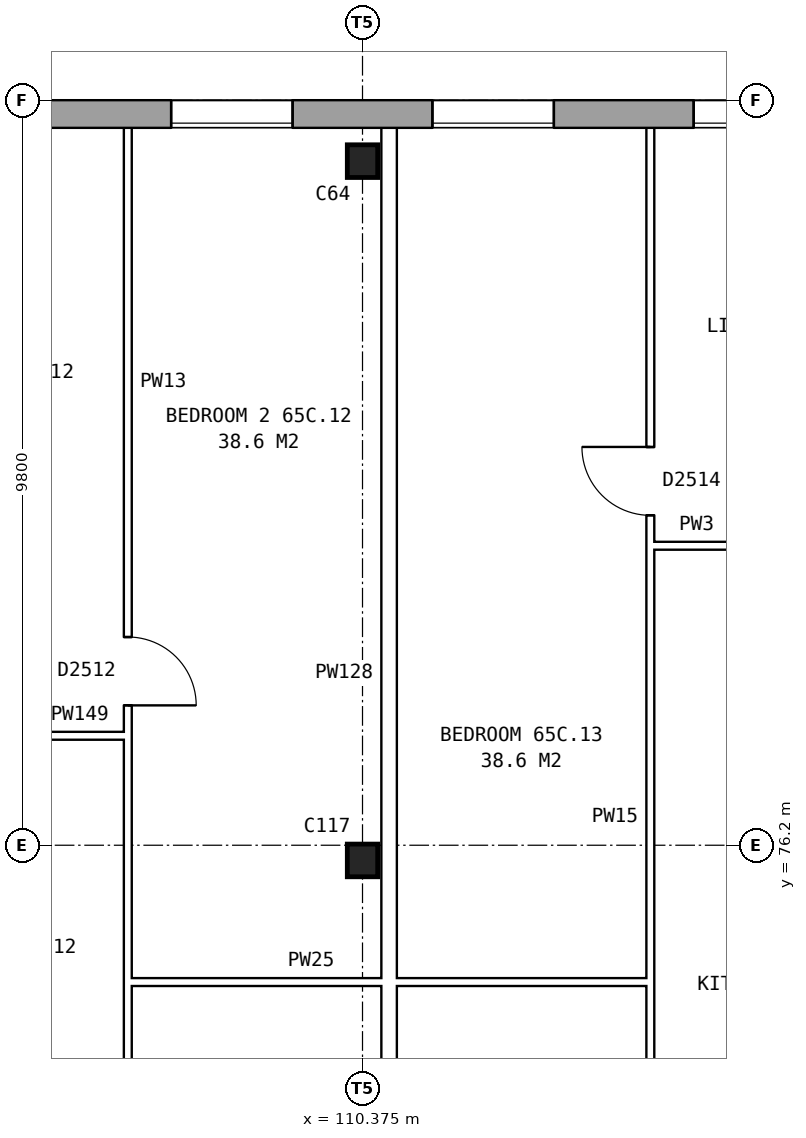
"""IFC4 building model, lengths in metres.
Left out: names, types, materials, properties, quantities, classifications, styles, units other than length and angle.
Written with IfcOpenShell. Run it as: python <this file> out.ifc"""

import sys

from ifc_helpers import new_model, si_unit, direction, frame, frame_2d, origin, origin_2d, place, context, subcontext, project, spatial, rectangle, i_section, extrude, element, fill, save


model = new_model("IFC4")
c1 = context("Model", 3, precision=1e-05, world=origin(), true_north=direction((0.0, 1.0)))
c2 = subcontext(c1, "Body", "Model", "MODEL_VIEW")
j1 = project(units=[si_unit("LENGTHUNIT", "METRE"), si_unit("PLANEANGLEUNIT", "RADIAN")], contexts=[c1])
p1 = place(None, origin())
s1 = spatial("IfcSite", under=j1, at=p1, CompositionType="ELEMENT")
p2 = place(p1, origin())
s2 = spatial("IfcBuilding", under=s1, at=p2, CompositionType="ELEMENT")
p3 = place(p2, frame((0.0, 0.0, 230.7)))
s3 = spatial("IfcBuildingStorey", under=s2, at=p3, CompositionType="ELEMENT", Elevation=230.7)
for number, where, z_axis, x_axis in (
    (1, (110.375, 76.0, 0.0), (0.0, 0.0, 1.0), (1.0, 0.0, 0.0)),
    (2, (110.375, 85.2, 0.0), (0.0, 0.0, 1.0), (1.0, 0.0, 0.0)),
):
    element("IfcColumn", number, at=place(p3, frame(where, z_axis=z_axis, x_axis=x_axis)), inside=s3, PredefinedType="COLUMN", context=c2, shape_type="SweptSolid", body=[
        extrude(i_section(OverallWidth=0.4, OverallDepth=0.43, WebThickness=0.028, FlangeThickness=0.04, at=origin_2d()), origin(), (0.0, 0.0, 1.0), 2.85),
    ])
p4 = place(p3, frame((131.05, 85.82, 0.0), z_axis=(0.0, 0.0, 1.0), x_axis=(-1.0, 0.0, 0.0)))
e3 = element("IfcWall", 3, at=p4, inside=s3, PredefinedType="STANDARD", context=c2, shape_type="SweptSolid", body=[
    extrude(rectangle(XDim=55.1, YDim=0.36, at=frame_2d((27.55, 0.0))), origin(), (0.0, 0.0, 1.0), 2.85),
])
p5 = place(p4, frame((0.969, 0.0, 0.8)))
e4 = element("IfcOpeningElement", 4, at=p5, cuts=e3, PredefinedType="OPENING", context=c2, shape_type="SweptSolid", body=[
    extrude(rectangle(XDim=1.6, YDim=1.8, at=frame_2d((0.8, 0.9))), frame((0.0, 0.19, 0.0), z_axis=(0.0, -1.0, 0.0), x_axis=(1.0, 0.0, 0.0)), (0.0, 0.0, 1.0), 0.38),
])
p6 = place(p4, frame((4.406, 0.0, 0.8)))
e5 = element("IfcOpeningElement", 5, at=p6, cuts=e3, PredefinedType="OPENING", context=c2, shape_type="SweptSolid", body=[
    extrude(rectangle(XDim=1.6, YDim=1.8, at=frame_2d((0.8, 0.9))), frame((0.0, 0.19, 0.0), z_axis=(0.0, -1.0, 0.0), x_axis=(1.0, 0.0, 0.0)), (0.0, 0.0, 1.0), 0.38),
])
p7 = place(p4, frame((7.844, 0.0, 0.8)))
e6 = element("IfcOpeningElement", 6, at=p7, cuts=e3, PredefinedType="OPENING", context=c2, shape_type="SweptSolid", body=[
    extrude(rectangle(XDim=1.6, YDim=1.8, at=frame_2d((0.8, 0.9))), frame((0.0, 0.19, 0.0), z_axis=(0.0, -1.0, 0.0), x_axis=(1.0, 0.0, 0.0)), (0.0, 0.0, 1.0), 0.38),
])
p8 = place(p4, frame((11.281, 0.0, 0.8)))
e7 = element("IfcOpeningElement", 7, at=p8, cuts=e3, PredefinedType="OPENING", context=c2, shape_type="SweptSolid", body=[
    extrude(rectangle(XDim=1.6, YDim=1.8, at=frame_2d((0.8, 0.9))), frame((0.0, 0.19, 0.0), z_axis=(0.0, -1.0, 0.0), x_axis=(1.0, 0.0, 0.0)), (0.0, 0.0, 1.0), 0.38),
])
p9 = place(p4, frame((14.719, 0.0, 0.8)))
e8 = element("IfcOpeningElement", 8, at=p9, cuts=e3, PredefinedType="OPENING", context=c2, shape_type="SweptSolid", body=[
    extrude(rectangle(XDim=1.6, YDim=1.8, at=frame_2d((0.8, 0.9))), frame((0.0, 0.19, 0.0), z_axis=(0.0, -1.0, 0.0), x_axis=(1.0, 0.0, 0.0)), (0.0, 0.0, 1.0), 0.38),
])
p10 = place(p4, frame((18.156, 0.0, 0.8)))
e9 = element("IfcOpeningElement", 9, at=p10, cuts=e3, PredefinedType="OPENING", context=c2, shape_type="SweptSolid", body=[
    extrude(rectangle(XDim=1.6, YDim=1.8, at=frame_2d((0.8, 0.9))), frame((0.0, 0.19, 0.0), z_axis=(0.0, -1.0, 0.0), x_axis=(1.0, 0.0, 0.0)), (0.0, 0.0, 1.0), 0.38),
])
p11 = place(p4, frame((21.594, 0.0, 0.8)))
e10 = element("IfcOpeningElement", 10, at=p11, cuts=e3, PredefinedType="OPENING", context=c2, shape_type="SweptSolid", body=[
    extrude(rectangle(XDim=1.6, YDim=1.8, at=frame_2d((0.8, 0.9))), frame((0.0, 0.19, 0.0), z_axis=(0.0, -1.0, 0.0), x_axis=(1.0, 0.0, 0.0)), (0.0, 0.0, 1.0), 0.38),
])
p12 = place(p4, frame((25.031, 0.0, 0.8)))
e11 = element("IfcOpeningElement", 11, at=p12, cuts=e3, PredefinedType="OPENING", context=c2, shape_type="SweptSolid", body=[
    extrude(rectangle(XDim=1.6, YDim=1.8, at=frame_2d((0.8, 0.9))), frame((0.0, 0.19, 0.0), z_axis=(0.0, -1.0, 0.0), x_axis=(1.0, 0.0, 0.0)), (0.0, 0.0, 1.0), 0.38),
])
p13 = place(p4, frame((28.469, 0.0, 0.8)))
e12 = element("IfcOpeningElement", 12, at=p13, cuts=e3, PredefinedType="OPENING", context=c2, shape_type="SweptSolid", body=[
    extrude(rectangle(XDim=1.6, YDim=1.8, at=frame_2d((0.8, 0.9))), frame((0.0, 0.19, 0.0), z_axis=(0.0, -1.0, 0.0), x_axis=(1.0, 0.0, 0.0)), (0.0, 0.0, 1.0), 0.38),
])
p14 = place(p4, frame((31.906, 0.0, 0.8)))
e13 = element("IfcOpeningElement", 13, at=p14, cuts=e3, PredefinedType="OPENING", context=c2, shape_type="SweptSolid", body=[
    extrude(rectangle(XDim=1.6, YDim=1.8, at=frame_2d((0.8, 0.9))), frame((0.0, 0.19, 0.0), z_axis=(0.0, -1.0, 0.0), x_axis=(1.0, 0.0, 0.0)), (0.0, 0.0, 1.0), 0.38),
])
p15 = place(p4, frame((35.344, 0.0, 0.8)))
e14 = element("IfcOpeningElement", 14, at=p15, cuts=e3, PredefinedType="OPENING", context=c2, shape_type="SweptSolid", body=[
    extrude(rectangle(XDim=1.6, YDim=1.8, at=frame_2d((0.8, 0.9))), frame((0.0, 0.19, 0.0), z_axis=(0.0, -1.0, 0.0), x_axis=(1.0, 0.0, 0.0)), (0.0, 0.0, 1.0), 0.38),
])
p16 = place(p4, frame((38.781, 0.0, 0.8)))
e15 = element("IfcOpeningElement", 15, at=p16, cuts=e3, PredefinedType="OPENING", context=c2, shape_type="SweptSolid", body=[
    extrude(rectangle(XDim=1.6, YDim=1.8, at=frame_2d((0.8, 0.9))), frame((0.0, 0.19, 0.0), z_axis=(0.0, -1.0, 0.0), x_axis=(1.0, 0.0, 0.0)), (0.0, 0.0, 1.0), 0.38),
])
p17 = place(p4, frame((42.219, 0.0, 0.8)))
e16 = element("IfcOpeningElement", 16, at=p17, cuts=e3, PredefinedType="OPENING", context=c2, shape_type="SweptSolid", body=[
    extrude(rectangle(XDim=1.6, YDim=1.8, at=frame_2d((0.8, 0.9))), frame((0.0, 0.19, 0.0), z_axis=(0.0, -1.0, 0.0), x_axis=(1.0, 0.0, 0.0)), (0.0, 0.0, 1.0), 0.38),
])
p18 = place(p4, frame((45.656, 0.0, 0.8)))
e17 = element("IfcOpeningElement", 17, at=p18, cuts=e3, PredefinedType="OPENING", context=c2, shape_type="SweptSolid", body=[
    extrude(rectangle(XDim=1.6, YDim=1.8, at=frame_2d((0.8, 0.9))), frame((0.0, 0.19, 0.0), z_axis=(0.0, -1.0, 0.0), x_axis=(1.0, 0.0, 0.0)), (0.0, 0.0, 1.0), 0.38),
])
p19 = place(p4, frame((49.094, 0.0, 0.8)))
e18 = element("IfcOpeningElement", 18, at=p19, cuts=e3, PredefinedType="OPENING", context=c2, shape_type="SweptSolid", body=[
    extrude(rectangle(XDim=1.6, YDim=1.8, at=frame_2d((0.8, 0.9))), frame((0.0, 0.19, 0.0), z_axis=(0.0, -1.0, 0.0), x_axis=(1.0, 0.0, 0.0)), (0.0, 0.0, 1.0), 0.38),
])
p20 = place(p4, frame((52.531, 0.0, 0.8)))
e19 = element("IfcOpeningElement", 19, at=p20, cuts=e3, PredefinedType="OPENING", context=c2, shape_type="SweptSolid", body=[
    extrude(rectangle(XDim=1.6, YDim=1.8, at=frame_2d((0.8, 0.9))), frame((0.0, 0.19, 0.0), z_axis=(0.0, -1.0, 0.0), x_axis=(1.0, 0.0, 0.0)), (0.0, 0.0, 1.0), 0.38),
])
p21 = place(p3, frame((107.287, 74.4, 0.0), z_axis=(0.0, 0.0, 1.0), x_axis=(1.0, 0.0, 0.0)))
e20 = element("IfcWall", 20, at=p21, inside=s3, PredefinedType="PARTITIONING", context=c2, shape_type="SweptSolid", body=[
    extrude(rectangle(XDim=6.875, YDim=0.1, at=frame_2d((3.438, 0.0))), origin(), (0.0, 0.0, 1.0), 2.85),
])
p22 = place(p3, frame((103.85, 77.64, 0.0), z_axis=(0.0, 0.0, 1.0), x_axis=(1.0, 0.0, 0.0)))
e21 = element("IfcWall", 21, at=p22, inside=s3, PredefinedType="PARTITIONING", context=c2, shape_type="SweptSolid", body=[
    extrude(rectangle(XDim=3.437, YDim=0.1, at=frame_2d((1.719, 0.0))), origin(), (0.0, 0.0, 1.0), 2.85),
])
p23 = place(p22, frame((1.269, 0.0, 0.0)))
e22 = element("IfcOpeningElement", 22, at=p23, cuts=e21, PredefinedType="OPENING", context=c2, shape_type="SweptSolid", body=[
    extrude(rectangle(XDim=0.9, YDim=2.1, at=frame_2d((0.45, 1.05))), frame((0.0, 0.06, 0.0), z_axis=(0.0, -1.0, 0.0), x_axis=(1.0, 0.0, 0.0)), (0.0, 0.0, 1.0), 0.12),
])
p24 = place(p3, frame((114.162, 80.14, 0.0), z_axis=(0.0, 0.0, 1.0), x_axis=(1.0, 0.0, 0.0)))
e23 = element("IfcWall", 23, at=p24, inside=s3, PredefinedType="PARTITIONING", context=c2, shape_type="SweptSolid", body=[
    extrude(rectangle(XDim=3.338, YDim=0.1, at=frame_2d((1.669, 0.0))), origin(), (0.0, 0.0, 1.0), 2.85),
])
p25 = place(p24, frame((1.219, 0.0, 0.0)))
e24 = element("IfcOpeningElement", 24, at=p25, cuts=e23, PredefinedType="OPENING", context=c2, shape_type="SweptSolid", body=[
    extrude(rectangle(XDim=0.9, YDim=2.1, at=frame_2d((0.45, 1.05))), frame((0.0, 0.06, 0.0), z_axis=(0.0, -1.0, 0.0), x_axis=(1.0, 0.0, 0.0)), (0.0, 0.0, 1.0), 0.12),
])
p26 = place(p3, frame((107.287, 71.3, 0.0), z_axis=(0.0, 0.0, 1.0), x_axis=(0.0, 1.0, 0.0)))
e25 = element("IfcWall", 25, at=p26, inside=s3, PredefinedType="PARTITIONING", context=c2, shape_type="SweptSolid", body=[
    extrude(rectangle(XDim=14.34, YDim=0.1, at=frame_2d((7.17, 0.0))), origin(), (0.0, 0.0, 1.0), 2.85),
])
p27 = place(p26, frame((6.74, 0.0, 0.0)))
e26 = element("IfcOpeningElement", 26, at=p27, cuts=e25, PredefinedType="OPENING", context=c2, shape_type="SweptSolid", body=[
    extrude(rectangle(XDim=0.9, YDim=2.1, at=frame_2d((0.45, 1.05))), frame((0.0, 0.06, 0.0), z_axis=(0.0, -1.0, 0.0), x_axis=(1.0, 0.0, 0.0)), (0.0, 0.0, 1.0), 0.12),
])
p28 = place(p26, frame((0.4, 0.0, 0.0)))
e27 = element("IfcOpeningElement", 27, at=p28, cuts=e25, PredefinedType="OPENING", context=c2, shape_type="SweptSolid", body=[
    extrude(rectangle(XDim=0.9, YDim=2.1, at=frame_2d((0.45, 1.05))), frame((0.0, 0.06, 0.0), z_axis=(0.0, -1.0, 0.0), x_axis=(1.0, 0.0, 0.0)), (0.0, 0.0, 1.0), 0.12),
])
p29 = place(p3, frame((110.725, 71.3, 0.0), z_axis=(0.0, 0.0, 1.0), x_axis=(0.0, 1.0, 0.0)))
e28 = element("IfcWall", 28, at=p29, inside=s3, PredefinedType="PARTITIONING", context=c2, shape_type="SweptSolid", body=[
    extrude(rectangle(XDim=14.34, YDim=0.2, at=frame_2d((7.17, 0.0))), origin(), (0.0, 0.0, 1.0), 2.85),
])
p30 = place(p3, frame((114.162, 71.3, 0.0), z_axis=(0.0, 0.0, 1.0), x_axis=(0.0, 1.0, 0.0)))
e29 = element("IfcWall", 29, at=p30, inside=s3, PredefinedType="PARTITIONING", context=c2, shape_type="SweptSolid", body=[
    extrude(rectangle(XDim=14.34, YDim=0.1, at=frame_2d((7.17, 0.0))), origin(), (0.0, 0.0, 1.0), 2.85),
])
p31 = place(p30, frame((9.24, 0.0, 0.0)))
e30 = element("IfcOpeningElement", 30, at=p31, cuts=e29, PredefinedType="OPENING", context=c2, shape_type="SweptSolid", body=[
    extrude(rectangle(XDim=0.9, YDim=2.1, at=frame_2d((0.45, 1.05))), frame((0.0, 0.06, 0.0), z_axis=(0.0, -1.0, 0.0), x_axis=(1.0, 0.0, 0.0)), (0.0, 0.0, 1.0), 0.12),
])
p32 = place(p30, frame((0.4, 0.0, 0.0)))
e31 = element("IfcOpeningElement", 31, at=p32, cuts=e29, PredefinedType="OPENING", context=c2, shape_type="SweptSolid", body=[
    extrude(rectangle(XDim=0.9, YDim=2.1, at=frame_2d((0.45, 1.05))), frame((0.0, 0.06, 0.0), z_axis=(0.0, -1.0, 0.0), x_axis=(1.0, 0.0, 0.0)), (0.0, 0.0, 1.0), 0.12),
])
p33 = place(p9, origin())
e32 = element("IfcWindow", 32, at=p33, inside=s3, PartitioningType="SINGLE_PANEL", PredefinedType="WINDOW", context=c2, shape_type="SweptSolid", body=[
    extrude(rectangle(XDim=1.6, YDim=1.8, at=frame_2d((0.8, 0.9))), frame((0.0, 0.15, 0.0), z_axis=(0.0, -1.0, 0.0), x_axis=(1.0, 0.0, 0.0)), (0.0, 0.0, 1.0), 0.06),
])
fill(e8, e32)
p34 = place(p10, origin())
e33 = element("IfcWindow", 33, at=p34, inside=s3, PartitioningType="SINGLE_PANEL", PredefinedType="WINDOW", context=c2, shape_type="SweptSolid", body=[
    extrude(rectangle(XDim=1.6, YDim=1.8, at=frame_2d((0.8, 0.9))), frame((0.0, 0.15, 0.0), z_axis=(0.0, -1.0, 0.0), x_axis=(1.0, 0.0, 0.0)), (0.0, 0.0, 1.0), 0.06),
])
fill(e9, e33)
p35 = place(p11, origin())
e34 = element("IfcWindow", 34, at=p35, inside=s3, PartitioningType="SINGLE_PANEL", PredefinedType="WINDOW", context=c2, shape_type="SweptSolid", body=[
    extrude(rectangle(XDim=1.6, YDim=1.8, at=frame_2d((0.8, 0.9))), frame((0.0, 0.15, 0.0), z_axis=(0.0, -1.0, 0.0), x_axis=(1.0, 0.0, 0.0)), (0.0, 0.0, 1.0), 0.06),
])
fill(e10, e34)
p36 = place(p27, frame((0.9, 0.0, 0.0), z_axis=(0.0, 0.0, 1.0), x_axis=(-1.0, 0.0, 0.0)))
e35 = element("IfcDoor", 35, at=p36, inside=s3, OperationType="SINGLE_SWING_RIGHT", PredefinedType="DOOR", context=c2, shape_type="SweptSolid", body=[
    extrude(rectangle(XDim=0.9, YDim=2.1, at=frame_2d((0.45, 1.05))), frame((0.0, 0.025, 0.0), z_axis=(0.0, -1.0, 0.0), x_axis=(1.0, 0.0, 0.0)), (0.0, 0.0, 1.0), 0.05),
])
fill(e26, e35)
p37 = place(p31, origin())
e36 = element("IfcDoor", 36, at=p37, inside=s3, OperationType="SINGLE_SWING_RIGHT", PredefinedType="DOOR", context=c2, shape_type="SweptSolid", body=[
    extrude(rectangle(XDim=0.9, YDim=2.1, at=frame_2d((0.45, 1.05))), frame((0.0, 0.025, 0.0), z_axis=(0.0, -1.0, 0.0), x_axis=(1.0, 0.0, 0.0)), (0.0, 0.0, 1.0), 0.05),
])
fill(e30, e36)
save(model, sys.argv[1])
